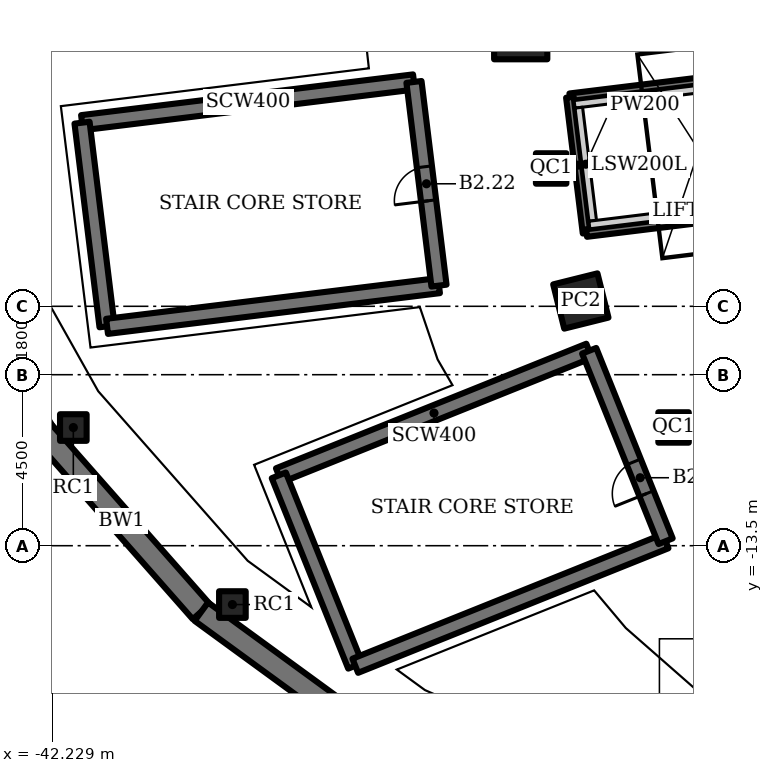
"""IFC4 building model, lengths in metres.
Left out: names, types, materials, properties, quantities, classifications, styles, units other than length and angle.
Written with IfcOpenShell. Run it as: python <this file> out.ifc"""

import sys

from ifc_helpers import new_model, si_unit, direction, frame, frame_2d, origin, origin_2d, place, context, subcontext, project, spatial, rectangle, hollow_rectangle, extrude, element, fill, save


model = new_model("IFC4")
c1 = context("Model", 3, precision=1e-05, world=origin(), true_north=direction((0.0, 1.0)))
c2 = subcontext(c1, "Body", "Model", "MODEL_VIEW")
j1 = project(units=[si_unit("LENGTHUNIT", "METRE"), si_unit("PLANEANGLEUNIT", "RADIAN")], contexts=[c1])
p1 = place(None, origin())
s1 = spatial("IfcSite", under=j1, at=p1, CompositionType="ELEMENT")
p2 = place(p1, origin())
s2 = spatial("IfcBuilding", under=s1, at=p2, CompositionType="ELEMENT")
p3 = place(p2, frame((0.0, 0.0, -10.0)))
s3 = spatial("IfcBuildingStorey", under=s2, at=p3, CompositionType="ELEMENT", Elevation=-10.0)
p4 = place(p3, frame((-29.9, 0.0, 0.0), z_axis=(0.0, 0.0, 1.0), x_axis=(1.0, 0.0, 0.0)))
e1 = element("IfcColumn", 1, at=p4, inside=s3, PredefinedType="COLUMN", context=c2, shape_type="SweptSolid", body=[
    extrude(hollow_rectangle(XDim=1.4, YDim=1.4, WallThickness=0.1, at=origin_2d()), origin(), (0.0, 0.0, 1.0), 4.5),
])
p5 = place(p3, frame((-28.318, -7.06, 0.0), z_axis=(0.0, 0.0, 1.0), x_axis=(0.970295726276, 0.2419218956, 0.0)))
e2 = element("IfcColumn", 2, at=p5, inside=s3, PredefinedType="COLUMN", context=c2, shape_type="SweptSolid", body=[
    extrude(hollow_rectangle(XDim=1.2, YDim=1.2, WallThickness=0.1, at=origin_2d()), origin(), (0.0, 0.0, 1.0), 4.5),
])
for number, where, z_axis, x_axis in (
    (3, (-29.099, -3.573, 0.0), (0.0, 0.0, 1.0), (1.0, 0.0, 0.0)),
    (4, (-25.878, -10.388, 0.0), (0.0, 0.0, 1.0), (1.0, 0.0, 0.0)),
):
    element("IfcColumn", number, at=place(p3, frame(where, z_axis=z_axis, x_axis=x_axis)), inside=s3, PredefinedType="COLUMN", context=c2, shape_type="SweptSolid", body=[
        extrude(hollow_rectangle(XDim=0.8, YDim=0.8, WallThickness=0.05, at=origin_2d()), origin(), (0.0, 0.0, 1.0), 4.5),
    ])
for number, where, z_axis, x_axis in (
    (5, (-37.487, -15.049, 0.0), (0.0, 0.0, 1.0), (1.0, 0.0, 0.0)),
    (6, (-41.672, -10.39, 0.0), (0.0, 0.0, 1.0), (1.0, 0.0, 0.0)),
):
    element("IfcColumn", number, at=place(p3, frame(where, z_axis=z_axis, x_axis=x_axis)), inside=s3, PredefinedType="COLUMN", context=c2, shape_type="SweptSolid", body=[
        extrude(hollow_rectangle(XDim=0.7, YDim=0.7, WallThickness=0.04, at=origin_2d()), origin(), (0.0, 0.0, 1.0), 4.5),
    ])
p6 = place(p3, frame((-42.494, -10.482, 0.0), z_axis=(0.0, 0.0, 1.0), x_axis=(0.66120355744, -0.75020654198, 0.0)))
e7 = element("IfcWall", 7, at=p6, inside=s3, PredefinedType="SOLIDWALL", context=c2, shape_type="SweptSolid", body=[
    extrude(rectangle(XDim=6.336, YDim=0.6, at=frame_2d((3.168, 0.0))), origin(), (0.0, 0.0, 1.0), 4.5),
])
p7 = place(p3, frame((-38.304, -15.235, 0.0), z_axis=(0.0, 0.0, 1.0), x_axis=(0.807901048768, -0.589318161437, 0.0)))
e8 = element("IfcWall", 8, at=p7, inside=s3, PredefinedType="SOLIDWALL", context=c2, shape_type="SweptSolid", body=[
    extrude(rectangle(XDim=6.163, YDim=0.6, at=frame_2d((3.082, 0.0))), origin(), (0.0, 0.0, 1.0), 4.5),
])
p8 = place(p3, frame((-32.708, -1.296, 0.0), z_axis=(0.0, 0.0, 1.0), x_axis=(-0.992545692684, -0.121873081252, 0.0)))
e9 = element("IfcWall", 9, at=p8, inside=s3, PredefinedType="SHEAR", context=c2, shape_type="SweptSolid", body=[
    extrude(rectangle(XDim=8.8, YDim=0.4, at=frame_2d((4.4, 0.0))), origin(), (0.0, 0.0, 1.0), 4.5),
])
p9 = place(p3, frame((-41.443, -2.368, 0.0), z_axis=(0.0, 0.0, 1.0), x_axis=(0.121892082937, -0.992543359314, 0.0)))
e10 = element("IfcWall", 10, at=p9, inside=s3, PredefinedType="SHEAR", context=c2, shape_type="SweptSolid", body=[
    extrude(rectangle(XDim=5.4, YDim=0.4, at=frame_2d((2.7, 0.0))), origin(), (0.0, 0.0, 1.0), 4.5),
])
p10 = place(p3, frame((-40.785, -7.728, 0.0), z_axis=(0.0, 0.0, 1.0), x_axis=(0.992545280606, 0.121876437212, 0.0)))
e11 = element("IfcWall", 11, at=p10, inside=s3, PredefinedType="SHEAR", context=c2, shape_type="SweptSolid", body=[
    extrude(rectangle(XDim=8.8, YDim=0.4, at=frame_2d((4.4, 0.0))), origin(), (0.0, 0.0, 1.0), 4.5),
])
p11 = place(p3, frame((-32.051, -6.656, 0.0), z_axis=(0.0, 0.0, 1.0), x_axis=(-0.12184754212, 0.99254882826, 0.0)))
e12 = element("IfcWall", 12, at=p11, inside=s3, PredefinedType="SHEAR", context=c2, shape_type="SweptSolid", body=[
    extrude(rectangle(XDim=5.4, YDim=0.4, at=frame_2d((2.7, 0.0))), origin(), (0.0, 0.0, 1.0), 4.5),
])
p12 = place(p11, frame((2.25, 0.0, 0.0)))
e13 = element("IfcOpeningElement", 13, at=p12, cuts=e12, PredefinedType="OPENING", context=c2, shape_type="SweptSolid", body=[
    extrude(rectangle(XDim=0.9, YDim=2.1, at=frame_2d((0.45, 1.05))), frame((0.0, 0.21, 0.0), z_axis=(0.0, -1.0, 0.0), x_axis=(1.0, 0.0, 0.0)), (0.0, 0.0, 1.0), 0.42),
])
p13 = place(p3, frame((-28.099, -8.371, 0.0), z_axis=(0.0, 0.0, 1.0), x_axis=(-0.92801678004, -0.372538395288, 0.0)))
e14 = element("IfcWall", 14, at=p13, inside=s3, PredefinedType="SHEAR", context=c2, shape_type="SweptSolid", body=[
    extrude(rectangle(XDim=8.8, YDim=0.4, at=frame_2d((4.4, 0.0))), origin(), (0.0, 0.0, 1.0), 4.5),
])
p14 = place(p3, frame((-36.265, -11.649, 0.0), z_axis=(0.0, 0.0, 1.0), x_axis=(0.372544066459, -0.928014503414, 0.0)))
e15 = element("IfcWall", 15, at=p14, inside=s3, PredefinedType="SHEAR", context=c2, shape_type="SweptSolid", body=[
    extrude(rectangle(XDim=5.4, YDim=0.4, at=frame_2d((2.7, 0.0))), origin(), (0.0, 0.0, 1.0), 4.5),
])
p15 = place(p3, frame((-34.253, -16.66, 0.0), z_axis=(0.0, 0.0, 1.0), x_axis=(0.92801678004, 0.372538395288, 0.0)))
e16 = element("IfcWall", 16, at=p15, inside=s3, PredefinedType="SHEAR", context=c2, shape_type="SweptSolid", body=[
    extrude(rectangle(XDim=8.8, YDim=0.4, at=frame_2d((4.4, 0.0))), origin(), (0.0, 0.0, 1.0), 4.5),
])
p16 = place(p3, frame((-26.087, -13.382, 0.0), z_axis=(0.0, 0.0, 1.0), x_axis=(-0.372544066459, 0.928014503414, 0.0)))
e17 = element("IfcWall", 17, at=p16, inside=s3, PredefinedType="SHEAR", context=c2, shape_type="SweptSolid", body=[
    extrude(rectangle(XDim=5.4, YDim=0.4, at=frame_2d((2.7, 0.0))), origin(), (0.0, 0.0, 1.0), 4.5),
])
p17 = place(p16, frame((1.35, 0.0, 0.0)))
e18 = element("IfcOpeningElement", 18, at=p17, cuts=e17, PredefinedType="OPENING", context=c2, shape_type="SweptSolid", body=[
    extrude(rectangle(XDim=0.9, YDim=2.1, at=frame_2d((0.45, 1.05))), frame((0.0, 0.21, 0.0), z_axis=(0.0, -1.0, 0.0), x_axis=(1.0, 0.0, 0.0)), (0.0, 0.0, 1.0), 0.42),
])
p18 = place(p3, frame((-22.329, -1.13, -1.8), z_axis=(0.0, 0.0, 1.0), x_axis=(-0.992545711723, -0.121872926199, 0.0)))
e19 = element("IfcWall", 19, at=p18, inside=s3, PredefinedType="SOLIDWALL", context=c2, shape_type="SweptSolid", body=[
    extrude(rectangle(XDim=6.2, YDim=0.2, at=frame_2d((3.1, 0.0))), origin(), (0.0, 0.0, 1.0), 1.0),
])
p19 = place(p3, frame((-28.371, -1.972, -1.8), z_axis=(0.0, 0.0, 1.0), x_axis=(0.121820978688, -0.992552088886, 0.0)))
e20 = element("IfcWall", 20, at=p19, inside=s3, PredefinedType="SOLIDWALL", context=c2, shape_type="SweptSolid", body=[
    extrude(rectangle(XDim=3.0, YDim=0.2, at=frame_2d((1.5, 0.0))), origin(), (0.0, 0.0, 1.0), 1.0),
])
p20 = place(p3, frame((-28.093, -5.061, -1.8), z_axis=(0.0, 0.0, 1.0), x_axis=(0.992545711723, 0.121872926199, 0.0)))
e21 = element("IfcWall", 21, at=p20, inside=s3, PredefinedType="SOLIDWALL", context=c2, shape_type="SweptSolid", body=[
    extrude(rectangle(XDim=6.2, YDim=0.2, at=frame_2d((3.1, 0.0))), origin(), (0.0, 0.0, 1.0), 1.0),
])
p21 = place(p3, frame((-22.254, -0.919, -2.1), z_axis=(0.0, 0.0, 1.0), x_axis=(-0.992544912608, -0.121879434097, 0.0)))
e22 = element("IfcWall", 22, at=p21, inside=s3, PredefinedType="SOLIDWALL", context=c2, shape_type="SweptSolid", body=[
    extrude(rectangle(XDim=6.4, YDim=0.2, at=frame_2d((3.2, 0.0))), origin(), (0.0, 0.0, 1.0), 6.3),
])
p22 = place(p3, frame((-28.606, -1.699, -2.1), z_axis=(0.0, 0.0, 1.0), x_axis=(0.121872547154, -0.992545758265, 0.0)))
e23 = element("IfcWall", 23, at=p22, inside=s3, PredefinedType="SOLIDWALL", context=c2, shape_type="SweptSolid", body=[
    extrude(rectangle(XDim=3.6, YDim=0.2, at=frame_2d((1.8, 0.0))), origin(), (0.0, 0.0, 1.0), 6.3),
])
p23 = place(p3, frame((-28.167, -5.272, -2.1), z_axis=(0.0, 0.0, 1.0), x_axis=(0.992549526583, 0.121841853565, 0.0)))
e24 = element("IfcWall", 24, at=p23, inside=s3, PredefinedType="SOLIDWALL", context=c2, shape_type="SweptSolid", body=[
    extrude(rectangle(XDim=6.4, YDim=0.2, at=frame_2d((3.2, 0.0))), origin(), (0.0, 0.0, 1.0), 6.3),
])
p24 = place(p12, origin())
e25 = element("IfcDoor", 25, at=p24, inside=s3, OperationType="SINGLE_SWING_LEFT", PredefinedType="DOOR", context=c2, shape_type="SweptSolid", body=[
    extrude(rectangle(XDim=0.9, YDim=2.1, at=frame_2d((0.45, 1.05))), frame((0.0, 0.025, 0.0), z_axis=(0.0, -1.0, 0.0), x_axis=(1.0, 0.0, 0.0)), (0.0, 0.0, 1.0), 0.05),
])
fill(e13, e25)
p25 = place(p17, origin())
e26 = element("IfcDoor", 26, at=p25, inside=s3, OperationType="SINGLE_SWING_LEFT", PredefinedType="DOOR", context=c2, shape_type="SweptSolid", body=[
    extrude(rectangle(XDim=0.9, YDim=2.1, at=frame_2d((0.45, 1.05))), frame((0.0, 0.025, 0.0), z_axis=(0.0, -1.0, 0.0), x_axis=(1.0, 0.0, 0.0)), (0.0, 0.0, 1.0), 0.05),
])
fill(e18, e26)
save(model, sys.argv[1])
